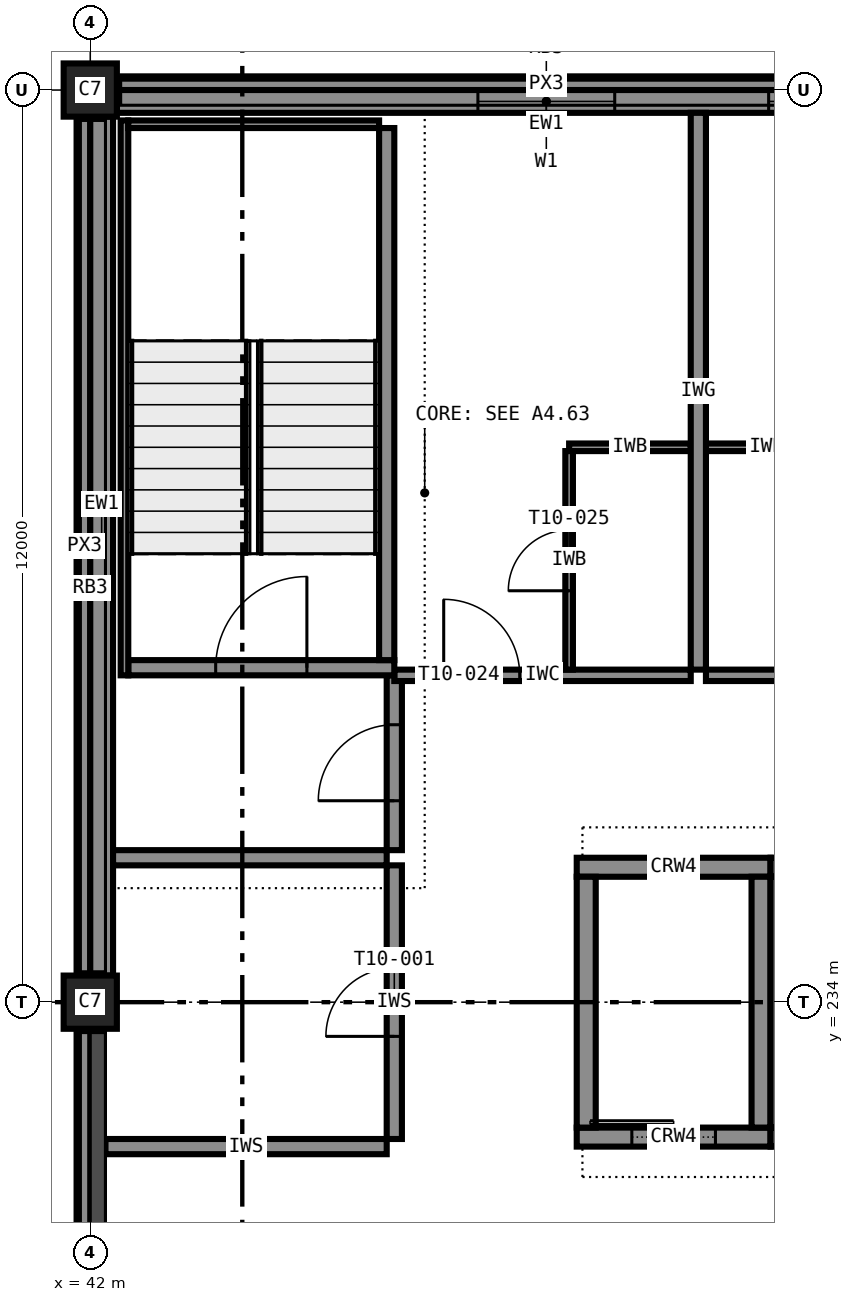
"""IFC4 building model, lengths in metres.
Left out: names, types, materials, properties, quantities, classifications, styles, units other than length and angle.
Written with IfcOpenShell. Run it as: python <this file> out.ifc"""

import sys

from ifc_helpers import new_model, si_unit, direction, frame, frame_2d, origin, origin_2d, place, context, subcontext, project, spatial, rectangle, extrude, element, fill, save


model = new_model("IFC4")
c1 = context("Model", 3, precision=1e-05, world=origin(), true_north=direction((0.0, 1.0)))
c2 = subcontext(c1, "Body", "Model", "MODEL_VIEW")
j1 = project(units=[si_unit("LENGTHUNIT", "METRE"), si_unit("PLANEANGLEUNIT", "RADIAN")], contexts=[c1])
p1 = place(None, origin())
s1 = spatial("IfcSite", under=j1, at=p1, CompositionType="ELEMENT")
p2 = place(p1, origin())
s2 = spatial("IfcBuilding", under=s1, at=p2, CompositionType="ELEMENT")
p3 = place(p2, frame((0.0, 0.0, 49.8)))
s3 = spatial("IfcBuildingStorey", under=s2, at=p3, CompositionType="ELEMENT", Elevation=49.8)
for number, where, z_axis, x_axis in (
    (1, (42.0, 234.0, 0.0), (0.0, 0.0, 1.0), (1.0, 0.0, 0.0)),
    (2, (42.0, 246.0, 0.0), (0.0, 0.0, 1.0), (1.0, 0.0, 0.0)),
):
    element("IfcColumn", number, at=place(p3, frame(where, z_axis=z_axis, x_axis=x_axis)), inside=s3, PredefinedType="COLUMN", context=c2, shape_type="SweptSolid", body=[
        extrude(rectangle(XDim=0.7, YDim=0.7, at=origin_2d()), origin(), (0.0, 0.0, 1.0), 3.6),
    ])
p4 = place(p3, frame((48.4, 232.225, 0.0), z_axis=(0.0, 0.0, 1.0), x_axis=(1.0, 0.0, 0.0)))
e3 = element("IfcWall", 3, at=p4, inside=s3, PredefinedType="SHEAR", context=c2, shape_type="SweptSolid", body=[
    extrude(rectangle(XDim=2.55, YDim=0.25, at=frame_2d((1.275, 0.0))), origin(), (0.0, 0.0, 1.0), 3.6),
])
p5 = place(p4, frame((0.725, 0.0, 0.0)))
e4 = element("IfcOpeningElement", 4, at=p5, cuts=e3, PredefinedType="OPENING", context=c2, shape_type="SweptSolid", body=[
    extrude(rectangle(XDim=1.1, YDim=2.1, at=frame_2d((0.55, 1.05))), frame((0.0, 0.135, 0.0), z_axis=(0.0, -1.0, 0.0), x_axis=(1.0, 0.0, 0.0)), (0.0, 0.0, 1.0), 0.27),
])
p6 = place(p3, frame((48.4, 235.775, 0.0), z_axis=(0.0, 0.0, 1.0), x_axis=(1.0, 0.0, 0.0)))
e5 = element("IfcWall", 5, at=p6, inside=s3, PredefinedType="SHEAR", context=c2, shape_type="SweptSolid", body=[
    extrude(rectangle(XDim=2.55, YDim=0.25, at=frame_2d((1.275, 0.0))), origin(), (0.0, 0.0, 1.0), 3.6),
])
for number, where, z_axis, x_axis in (
    (6, (48.525, 232.35, 0.0), (0.0, 0.0, 1.0), (0.0, 1.0, 0.0)),
    (7, (50.825, 232.35, 0.0), (0.0, 0.0, 1.0), (0.0, 1.0, 0.0)),
):
    element("IfcWall", number, at=place(p3, frame(where, z_axis=z_axis, x_axis=x_axis)), inside=s3, PredefinedType="SHEAR", context=c2, shape_type="SweptSolid", body=[
        extrude(rectangle(XDim=3.3, YDim=0.25, at=frame_2d((1.65, 0.0))), origin(), (0.0, 0.0, 1.0), 3.6),
    ])
p7 = place(p3, frame((50.95, 232.225, 0.0), z_axis=(0.0, 0.0, 1.0), x_axis=(1.0, 0.0, 0.0)))
e8 = element("IfcWall", 8, at=p7, inside=s3, PredefinedType="SHEAR", context=c2, shape_type="SweptSolid", body=[
    extrude(rectangle(XDim=2.55, YDim=0.25, at=frame_2d((1.275, 0.0))), origin(), (0.0, 0.0, 1.0), 3.6),
])
p8 = place(p7, frame((0.725, 0.0, 0.0)))
e9 = element("IfcOpeningElement", 9, at=p8, cuts=e8, PredefinedType="OPENING", context=c2, shape_type="SweptSolid", body=[
    extrude(rectangle(XDim=1.1, YDim=2.1, at=frame_2d((0.55, 1.05))), frame((0.0, 0.135, 0.0), z_axis=(0.0, -1.0, 0.0), x_axis=(1.0, 0.0, 0.0)), (0.0, 0.0, 1.0), 0.27),
])
p9 = place(p3, frame((50.95, 235.775, 0.0), z_axis=(0.0, 0.0, 1.0), x_axis=(1.0, 0.0, 0.0)))
e10 = element("IfcWall", 10, at=p9, inside=s3, PredefinedType="SHEAR", context=c2, shape_type="SweptSolid", body=[
    extrude(rectangle(XDim=2.55, YDim=0.25, at=frame_2d((1.275, 0.0))), origin(), (0.0, 0.0, 1.0), 3.6),
])
p10 = place(p3, frame((51.075, 232.35, 0.0), z_axis=(0.0, 0.0, 1.0), x_axis=(0.0, 1.0, 0.0)))
e11 = element("IfcWall", 11, at=p10, inside=s3, PredefinedType="SHEAR", context=c2, shape_type="SweptSolid", body=[
    extrude(rectangle(XDim=3.3, YDim=0.25, at=frame_2d((1.65, 0.0))), origin(), (0.0, 0.0, 1.0), 3.6),
])
p11 = place(p3, frame((42.5, 238.4, 0.0), z_axis=(0.0, 0.0, 1.0), x_axis=(1.0, 0.0, 0.0)))
e12 = element("IfcWall", 12, at=p11, inside=s3, PredefinedType="SHEAR", context=c2, shape_type="SweptSolid", body=[
    extrude(rectangle(XDim=3.5, YDim=0.2, at=frame_2d((1.75, 0.0))), origin(), (0.0, 0.0, 1.0), 3.6),
])
p12 = place(p11, frame((1.15, 0.0, 0.0)))
e13 = element("IfcOpeningElement", 13, at=p12, cuts=e12, PredefinedType="OPENING", context=c2, shape_type="SweptSolid", body=[
    extrude(rectangle(XDim=1.2, YDim=2.1, at=frame_2d((0.6, 1.05))), frame((0.0, 0.11, 0.0), z_axis=(0.0, -1.0, 0.0), x_axis=(1.0, 0.0, 0.0)), (0.0, 0.0, 1.0), 0.22),
])
p13 = place(p3, frame((45.9, 238.5, 0.0), z_axis=(0.0, 0.0, 1.0), x_axis=(0.0, 1.0, 0.0)))
e14 = element("IfcWall", 14, at=p13, inside=s3, PredefinedType="SHEAR", context=c2, shape_type="SweptSolid", body=[
    extrude(rectangle(XDim=7.0, YDim=0.2, at=frame_2d((3.5, 0.0))), origin(), (0.0, 0.0, 1.0), 3.6),
])
p14 = place(p3, frame((42.45, 238.3, 0.0), z_axis=(0.0, 0.0, 1.0), x_axis=(0.0, 1.0, 0.0)))
e15 = element("IfcWall", 15, at=p14, inside=s3, PredefinedType="SHEAR", context=c2, shape_type="SweptSolid", body=[
    extrude(rectangle(XDim=7.3, YDim=0.1, at=frame_2d((3.65, 0.0))), origin(), (0.0, 0.0, 1.0), 3.4),
])
p15 = place(p3, frame((42.5, 245.55, 0.0), z_axis=(0.0, 0.0, 1.0), x_axis=(1.0, 0.0, 0.0)))
e16 = element("IfcWall", 16, at=p15, inside=s3, PredefinedType="SHEAR", context=c2, shape_type="SweptSolid", body=[
    extrude(rectangle(XDim=3.3, YDim=0.1, at=frame_2d((1.65, 0.0))), origin(), (0.0, 0.0, 1.0), 3.4),
])
p16 = place(p3, frame((53.65, 245.85, 0.0), z_axis=(0.0, 0.0, 1.0), x_axis=(-1.0, 0.0, 0.0)))
e17 = element("IfcWall", 17, at=p16, inside=s3, PredefinedType="STANDARD", context=c2, shape_type="SweptSolid", body=[
    extrude(rectangle(XDim=11.3, YDim=0.3, at=frame_2d((5.65, 0.0))), origin(), (0.0, 0.0, 1.0), 2.6),
])
p17 = place(p16, frame((4.75, 0.0, 0.85)))
e18 = element("IfcOpeningElement", 18, at=p17, cuts=e17, PredefinedType="OPENING", context=c2, shape_type="SweptSolid", body=[
    extrude(rectangle(XDim=1.8, YDim=1.75, at=frame_2d((0.9, 0.875))), frame((0.0, 0.16, 0.0), z_axis=(0.0, -1.0, 0.0), x_axis=(1.0, 0.0, 0.0)), (0.0, 0.0, 1.0), 0.32),
])
p18 = place(p16, frame((0.925, 0.0, 0.85)))
e19 = element("IfcOpeningElement", 19, at=p18, cuts=e17, PredefinedType="OPENING", context=c2, shape_type="SweptSolid", body=[
    extrude(rectangle(XDim=1.8, YDim=1.75, at=frame_2d((0.9, 0.875))), frame((0.0, 0.16, 0.0), z_axis=(0.0, -1.0, 0.0), x_axis=(1.0, 0.0, 0.0)), (0.0, 0.0, 1.0), 0.32),
])
p19 = place(p3, frame((53.65, 246.075, 3.4), z_axis=(0.0, 0.0, 1.0), x_axis=(-1.0, 0.0, 0.0)))
e20 = element("IfcWall", 20, at=p19, inside=s3, PredefinedType="STANDARD", context=c2, shape_type="SweptSolid", body=[
    extrude(rectangle(XDim=11.3, YDim=0.15, at=frame_2d((5.65, 0.0))), origin(), (0.0, 0.0, 1.0), 0.2),
])
p20 = place(p3, frame((42.15, 245.65, 0.0), z_axis=(0.0, 0.0, 1.0), x_axis=(0.0, -1.0, 0.0)))
e21 = element("IfcWall", 21, at=p20, inside=s3, PredefinedType="STANDARD", context=c2, shape_type="SweptSolid", body=[
    extrude(rectangle(XDim=11.3, YDim=0.3, at=frame_2d((5.65, 0.0))), origin(), (0.0, 0.0, 1.0), 2.6),
])
for number, where, z_axis, x_axis in (
    (22, (41.925, 245.65, 3.4), (0.0, 0.0, 1.0), (0.0, -1.0, 0.0)),
    (23, (41.925, 233.65, 3.4), (0.0, 0.0, 1.0), (0.0, -1.0, 0.0)),
):
    element("IfcWall", number, at=place(p3, frame(where, z_axis=z_axis, x_axis=x_axis)), inside=s3, PredefinedType="STANDARD", context=c2, shape_type="SweptSolid", body=[
        extrude(rectangle(XDim=11.3, YDim=0.15, at=frame_2d((5.65, 0.0))), origin(), (0.0, 0.0, 1.0), 0.2),
    ])
p21 = place(p3, frame((42.2, 232.1, 0.0), z_axis=(0.0, 0.0, 1.0), x_axis=(1.0, 0.0, 0.0)))
e24 = element("IfcWall", 24, at=p21, inside=s3, PredefinedType="PARTITIONING", context=c2, shape_type="SweptSolid", body=[
    extrude(rectangle(XDim=3.7, YDim=0.2, at=frame_2d((1.85, 0.0))), origin(), (0.0, 0.0, 1.0), 3.4),
])
p22 = place(p3, frame((42.3, 235.9, 0.0), z_axis=(0.0, 0.0, 1.0), x_axis=(1.0, 0.0, 0.0)))
e25 = element("IfcWall", 25, at=p22, inside=s3, PredefinedType="PARTITIONING", context=c2, shape_type="SweptSolid", body=[
    extrude(rectangle(XDim=3.6, YDim=0.2, at=frame_2d((1.8, 0.0))), origin(), (0.0, 0.0, 1.0), 3.4),
])
p23 = place(p3, frame((46.0, 232.2, 0.0), z_axis=(0.0, 0.0, 1.0), x_axis=(0.0, 1.0, 0.0)))
e26 = element("IfcWall", 26, at=p23, inside=s3, PredefinedType="PARTITIONING", context=c2, shape_type="SweptSolid", body=[
    extrude(rectangle(XDim=3.6, YDim=0.2, at=frame_2d((1.8, 0.0))), origin(), (0.0, 0.0, 1.0), 3.4),
])
p24 = place(p23, frame((1.35, 0.0, 0.0)))
e27 = element("IfcOpeningElement", 27, at=p24, cuts=e26, PredefinedType="OPENING", context=c2, shape_type="SweptSolid", body=[
    extrude(rectangle(XDim=0.9, YDim=2.1, at=frame_2d((0.45, 1.05))), frame((0.0, 0.11, 0.0), z_axis=(0.0, -1.0, 0.0), x_axis=(1.0, 0.0, 0.0)), (0.0, 0.0, 1.0), 0.22),
])
p25 = place(p3, frame((46.0, 236.0, 0.0), z_axis=(0.0, 0.0, 1.0), x_axis=(0.0, 1.0, 0.0)))
e28 = element("IfcWall", 28, at=p25, inside=s3, PredefinedType="PARTITIONING", context=c2, shape_type="SweptSolid", body=[
    extrude(rectangle(XDim=2.3, YDim=0.2, at=frame_2d((1.15, 0.0))), origin(), (0.0, 0.0, 1.0), 3.4),
])
p26 = place(p25, frame((0.65, 0.0, 0.0)))
e29 = element("IfcOpeningElement", 29, at=p26, cuts=e28, PredefinedType="OPENING", context=c2, shape_type="SweptSolid", body=[
    extrude(rectangle(XDim=1.0, YDim=2.1, at=frame_2d((0.5, 1.05))), frame((0.0, 0.11, 0.0), z_axis=(0.0, -1.0, 0.0), x_axis=(1.0, 0.0, 0.0)), (0.0, 0.0, 1.0), 0.22),
])
p27 = place(p3, frame((46.0, 238.3, 0.0), z_axis=(0.0, 0.0, 1.0), x_axis=(1.0, 0.0, 0.0)))
e30 = element("IfcWall", 30, at=p27, inside=s3, PredefinedType="PARTITIONING", context=c2, shape_type="SweptSolid", body=[
    extrude(rectangle(XDim=3.9, YDim=0.15, at=frame_2d((1.95, 0.0))), origin(), (0.0, 0.0, 1.0), 3.4),
])
p28 = place(p27, frame((0.65, 0.0, 0.0)))
e31 = element("IfcOpeningElement", 31, at=p28, cuts=e30, PredefinedType="OPENING", context=c2, shape_type="SweptSolid", body=[
    extrude(rectangle(XDim=1.0, YDim=2.1, at=frame_2d((0.5, 1.05))), frame((0.0, 0.085, 0.0), z_axis=(0.0, -1.0, 0.0), x_axis=(1.0, 0.0, 0.0)), (0.0, 0.0, 1.0), 0.17),
])
p29 = place(p3, frame((48.3, 241.3, 0.0), z_axis=(0.0, 0.0, 1.0), x_axis=(1.0, 0.0, 0.0)))
e32 = element("IfcWall", 32, at=p29, inside=s3, PredefinedType="PARTITIONING", context=c2, shape_type="SweptSolid", body=[
    extrude(rectangle(XDim=1.6, YDim=0.1, at=frame_2d((0.8, 0.0))), origin(), (0.0, 0.0, 1.0), 3.4),
])
p30 = place(p3, frame((48.3, 238.375, 0.0), z_axis=(0.0, 0.0, 1.0), x_axis=(0.0, 1.0, 0.0)))
e33 = element("IfcWall", 33, at=p30, inside=s3, PredefinedType="PARTITIONING", context=c2, shape_type="SweptSolid", body=[
    extrude(rectangle(XDim=2.875, YDim=0.1, at=frame_2d((1.438, 0.0))), origin(), (0.0, 0.0, 1.0), 3.4),
])
p31 = place(p30, frame((1.038, 0.0, 0.0)))
e34 = element("IfcOpeningElement", 34, at=p31, cuts=e33, PredefinedType="OPENING", context=c2, shape_type="SweptSolid", body=[
    extrude(rectangle(XDim=0.8, YDim=2.1, at=frame_2d((0.4, 1.05))), frame((0.0, 0.06, 0.0), z_axis=(0.0, -1.0, 0.0), x_axis=(1.0, 0.0, 0.0)), (0.0, 0.0, 1.0), 0.12),
])
p32 = place(p3, frame((50.1, 238.3, 0.0), z_axis=(0.0, 0.0, 1.0), x_axis=(1.0, 0.0, 0.0)))
e35 = element("IfcWall", 35, at=p32, inside=s3, PredefinedType="PARTITIONING", context=c2, shape_type="SweptSolid", body=[
    extrude(rectangle(XDim=3.8, YDim=0.15, at=frame_2d((1.9, 0.0))), origin(), (0.0, 0.0, 1.0), 3.4),
])
p33 = place(p32, frame((2.25, 0.0, 0.0)))
e36 = element("IfcOpeningElement", 36, at=p33, cuts=e35, PredefinedType="OPENING", context=c2, shape_type="SweptSolid", body=[
    extrude(rectangle(XDim=1.0, YDim=2.1, at=frame_2d((0.5, 1.05))), frame((0.0, 0.085, 0.0), z_axis=(0.0, -1.0, 0.0), x_axis=(1.0, 0.0, 0.0)), (0.0, 0.0, 1.0), 0.17),
])
p34 = place(p3, frame((50.1, 241.3, 0.0), z_axis=(0.0, 0.0, 1.0), x_axis=(1.0, 0.0, 0.0)))
e37 = element("IfcWall", 37, at=p34, inside=s3, PredefinedType="PARTITIONING", context=c2, shape_type="SweptSolid", body=[
    extrude(rectangle(XDim=1.6, YDim=0.1, at=frame_2d((0.8, 0.0))), origin(), (0.0, 0.0, 1.0), 3.4),
])
p35 = place(p3, frame((50.0, 245.7, 0.0), z_axis=(0.0, 0.0, 1.0), x_axis=(0.0, -1.0, 0.0)))
e38 = element("IfcWall", 38, at=p35, inside=s3, PredefinedType="PARTITIONING", context=c2, shape_type="SweptSolid", body=[
    extrude(rectangle(XDim=7.325, YDim=0.2, at=frame_2d((3.663, 0.0))), origin(), (0.0, 0.0, 1.0), 3.4),
])
p36 = place(p17, origin())
e39 = element("IfcWindow", 39, at=p36, inside=s3, PartitioningType="SINGLE_PANEL", PredefinedType="WINDOW", context=c2, shape_type="SweptSolid", body=[
    extrude(rectangle(XDim=1.8, YDim=1.75, at=frame_2d((0.9, 0.875))), frame((0.0, 0.03, 0.0), z_axis=(0.0, -1.0, 0.0), x_axis=(1.0, 0.0, 0.0)), (0.0, 0.0, 1.0), 0.06),
])
fill(e18, e39)
p37 = place(p18, origin())
e40 = element("IfcWindow", 40, at=p37, inside=s3, PartitioningType="SINGLE_PANEL", PredefinedType="WINDOW", context=c2, shape_type="SweptSolid", body=[
    extrude(rectangle(XDim=1.8, YDim=1.75, at=frame_2d((0.9, 0.875))), frame((0.0, 0.03, 0.0), z_axis=(0.0, -1.0, 0.0), x_axis=(1.0, 0.0, 0.0)), (0.0, 0.0, 1.0), 0.06),
])
fill(e19, e40)
p38 = place(p24, origin())
e41 = element("IfcDoor", 41, at=p38, inside=s3, OperationType="SINGLE_SWING_LEFT", PredefinedType="DOOR", context=c2, shape_type="SweptSolid", body=[
    extrude(rectangle(XDim=0.9, YDim=2.1, at=frame_2d((0.45, 1.05))), frame((0.0, 0.025, 0.0), z_axis=(0.0, -1.0, 0.0), x_axis=(1.0, 0.0, 0.0)), (0.0, 0.0, 1.0), 0.05),
])
fill(e27, e41)
p39 = place(p26, origin())
e42 = element("IfcDoor", 42, at=p39, inside=s3, OperationType="SINGLE_SWING_LEFT", PredefinedType="DOOR", context=c2, shape_type="SweptSolid", body=[
    extrude(rectangle(XDim=1.0, YDim=2.1, at=frame_2d((0.5, 1.05))), frame((0.0, 0.025, 0.0), z_axis=(0.0, -1.0, 0.0), x_axis=(1.0, 0.0, 0.0)), (0.0, 0.0, 1.0), 0.05),
])
fill(e29, e42)
p40 = place(p28, origin())
e43 = element("IfcDoor", 43, at=p40, inside=s3, OperationType="SINGLE_SWING_LEFT", PredefinedType="DOOR", context=c2, shape_type="SweptSolid", body=[
    extrude(rectangle(XDim=1.0, YDim=2.1, at=frame_2d((0.5, 1.05))), frame((0.0, 0.025, 0.0), z_axis=(0.0, -1.0, 0.0), x_axis=(1.0, 0.0, 0.0)), (0.0, 0.0, 1.0), 0.05),
])
fill(e31, e43)
p41 = place(p31, origin())
e44 = element("IfcDoor", 44, at=p41, inside=s3, OperationType="SINGLE_SWING_LEFT", PredefinedType="DOOR", context=c2, shape_type="SweptSolid", body=[
    extrude(rectangle(XDim=0.8, YDim=2.1, at=frame_2d((0.4, 1.05))), frame((0.0, 0.025, 0.0), z_axis=(0.0, -1.0, 0.0), x_axis=(1.0, 0.0, 0.0)), (0.0, 0.0, 1.0), 0.05),
])
fill(e34, e44)
p42 = place(p5, origin())
e45 = element("IfcDoor", 45, at=p42, inside=s3, OperationType="SLIDING_TO_LEFT", PredefinedType="DOOR", context=c2, shape_type="SweptSolid", body=[
    extrude(rectangle(XDim=1.1, YDim=2.1, at=frame_2d((0.55, 1.05))), frame((0.0, 0.025, 0.0), z_axis=(0.0, -1.0, 0.0), x_axis=(1.0, 0.0, 0.0)), (0.0, 0.0, 1.0), 0.05),
])
fill(e4, e45)
p43 = place(p12, origin())
e46 = element("IfcDoor", 46, at=p43, inside=s3, OperationType="SINGLE_SWING_RIGHT", PredefinedType="DOOR", context=c2, shape_type="SweptSolid", body=[
    extrude(rectangle(XDim=1.2, YDim=2.1, at=frame_2d((0.6, 1.05))), frame((0.0, 0.025, 0.0), z_axis=(0.0, -1.0, 0.0), x_axis=(1.0, 0.0, 0.0)), (0.0, 0.0, 1.0), 0.05),
])
fill(e13, e46)
save(model, sys.argv[1])
